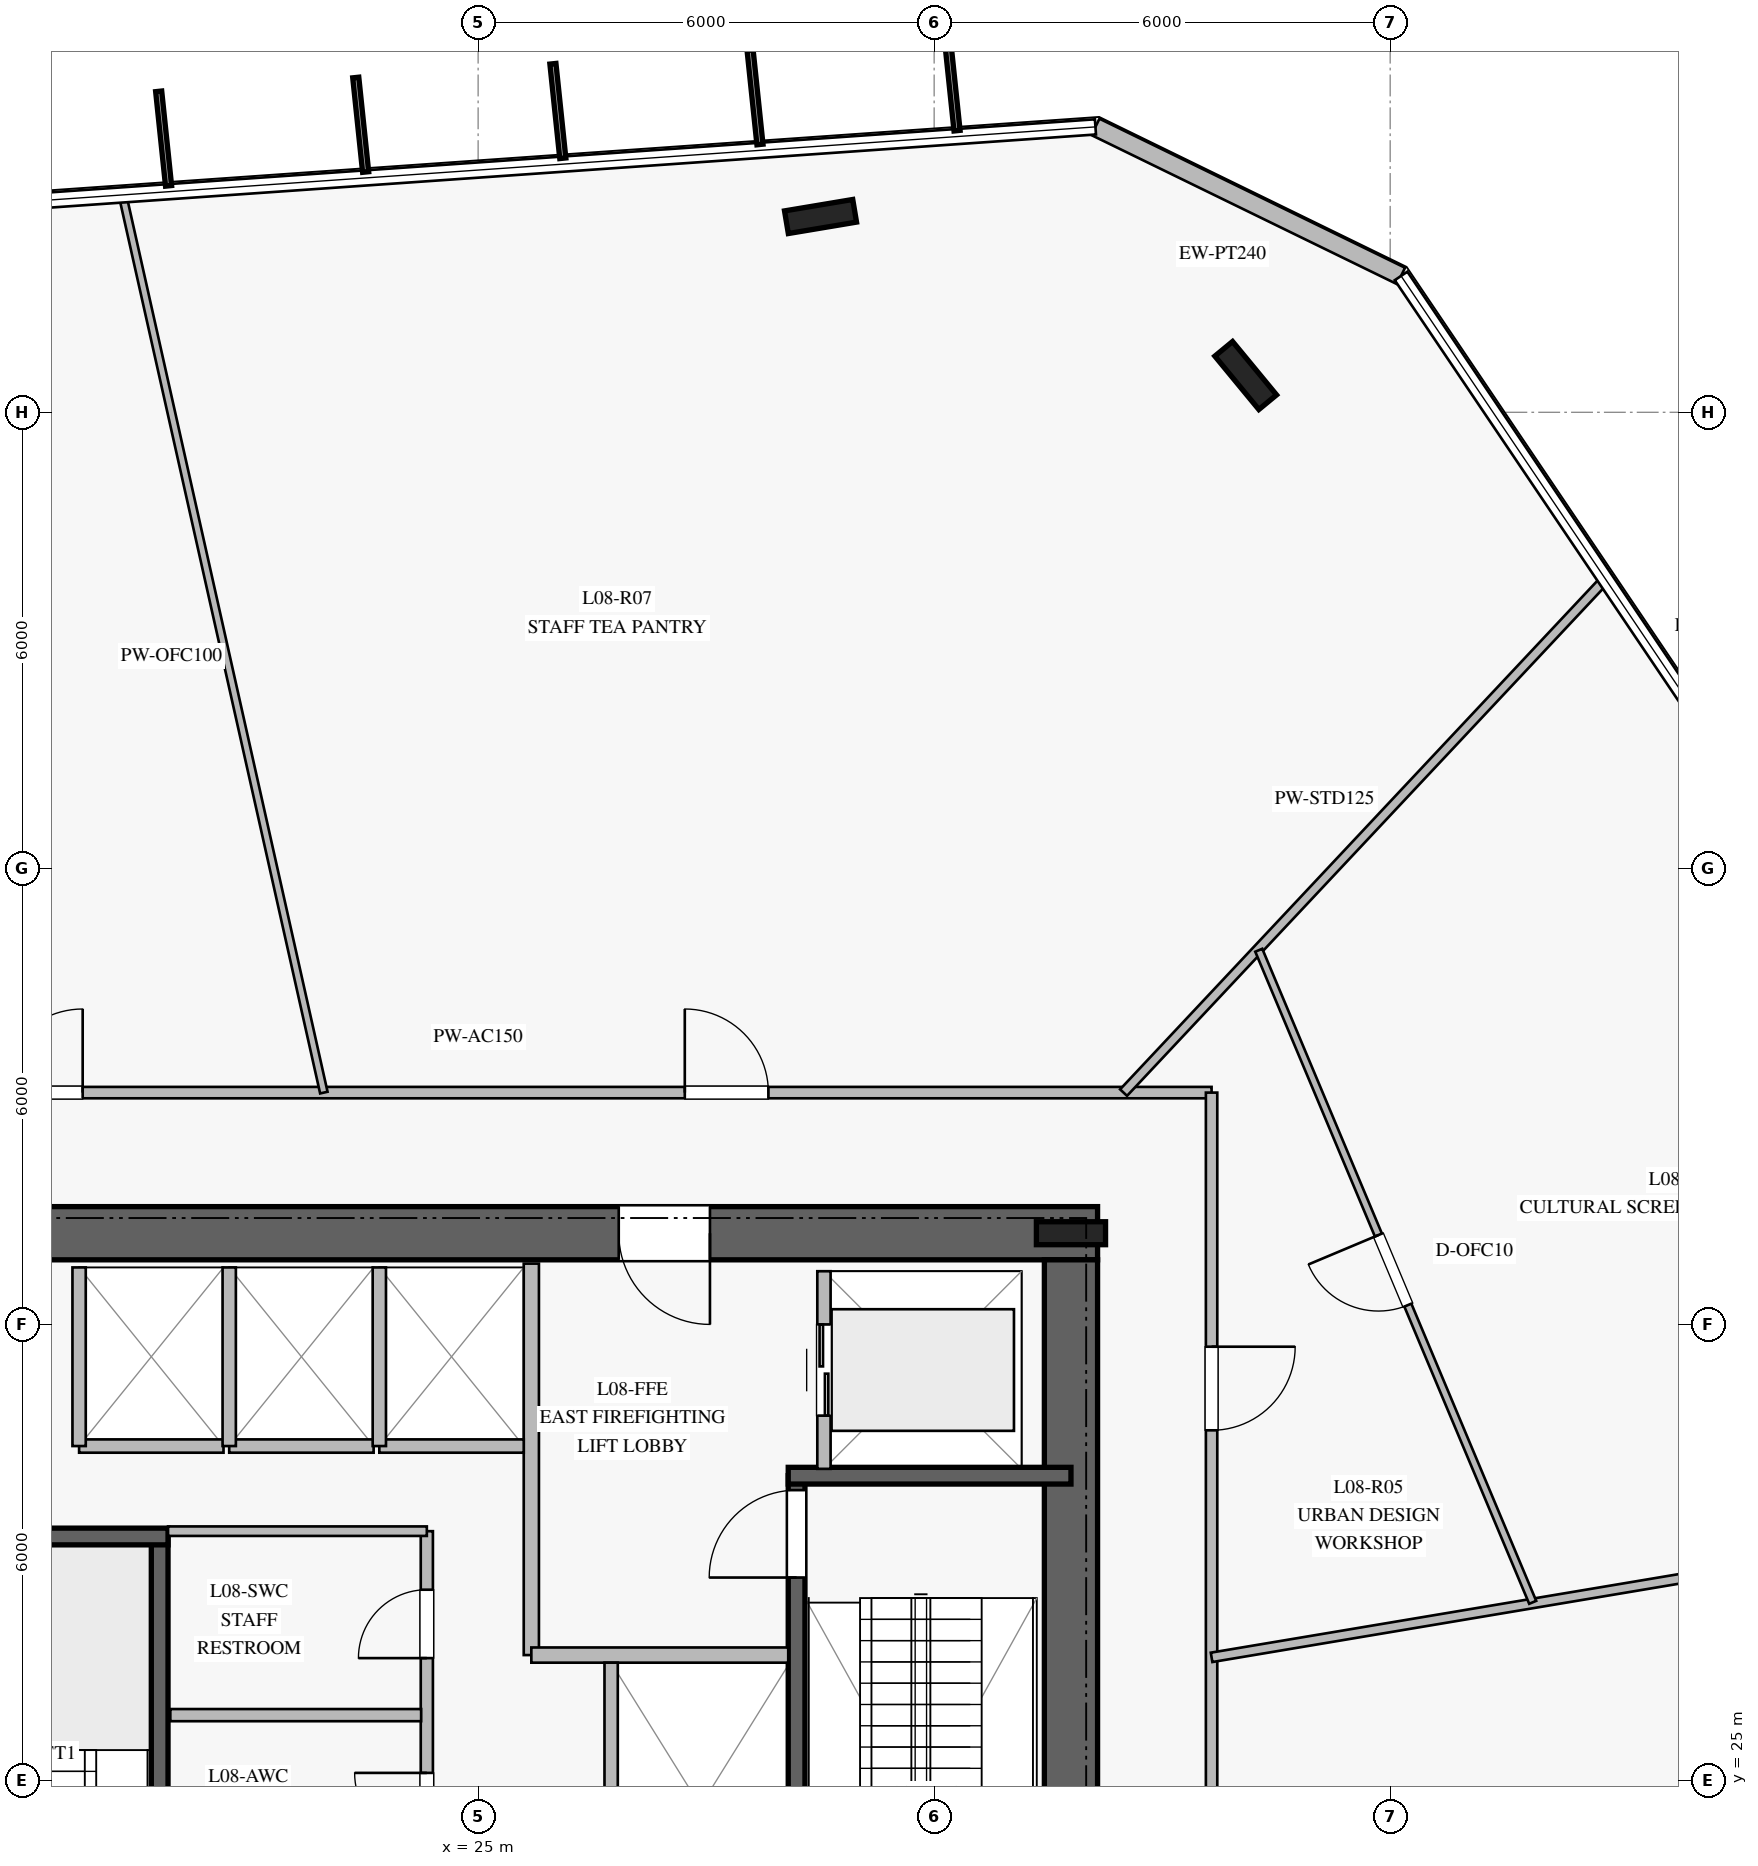
"""IFC4 building model, lengths in metres.
Left out: names, types, materials, properties, quantities, classifications, styles, units other than length and angle.
Written with IfcOpenShell. Run it as: python <this file> out.ifc"""

import sys

from ifc_helpers import new_model, si_unit, direction, frame, frame_2d, origin, origin_2d, place, context, subcontext, project, spatial, rectangle, i_section, extrude, element, fill, save


model = new_model("IFC4")
c1 = context("Model", 3, precision=1e-05, world=origin(), true_north=direction((0.0, 1.0)))
c2 = subcontext(c1, "Body", "Model", "MODEL_VIEW")
j1 = project(units=[si_unit("LENGTHUNIT", "METRE"), si_unit("PLANEANGLEUNIT", "RADIAN")], contexts=[c1])
p1 = place(None, origin())
s1 = spatial("IfcSite", under=j1, at=p1, CompositionType="ELEMENT")
p2 = place(p1, origin())
s2 = spatial("IfcBuilding", under=s1, at=p2, CompositionType="ELEMENT")
p3 = place(p2, frame((0.0, 0.0, 36.0)))
s3 = spatial("IfcBuildingStorey", under=s2, at=p3, CompositionType="ELEMENT", Elevation=36.0)
p4 = place(p3, frame((33.15, 32.2, 0.0), z_axis=(0.0, 0.0, 1.0), x_axis=(-1.0, 0.0, 0.0)))
e1 = element("IfcWall", 1, at=p4, inside=s3, PredefinedType="SHEAR", context=c2, shape_type="SweptSolid", body=[
    extrude(rectangle(XDim=16.3, YDim=0.7, at=frame_2d((8.15, 0.0))), origin(), (0.0, 0.0, 1.0), 3.76),
])
p5 = place(p4, frame((5.1, 0.0, 0.0)))
e2 = element("IfcOpeningElement", 2, at=p5, cuts=e1, PredefinedType="OPENING", context=c2, shape_type="SweptSolid", body=[
    extrude(rectangle(XDim=1.2, YDim=2.25, at=frame_2d((0.6, 1.125))), frame((0.0, 0.36, 0.0), z_axis=(0.0, -1.0, 0.0), x_axis=(1.0, 0.0, 0.0)), (0.0, 0.0, 1.0), 0.72),
])
p6 = place(p3, frame((32.8, 18.15, 0.0), z_axis=(0.0, 0.0, 1.0), x_axis=(0.0, 1.0, 0.0)))
e3 = element("IfcWall", 3, at=p6, inside=s3, PredefinedType="SHEAR", context=c2, shape_type="SweptSolid", body=[
    extrude(rectangle(XDim=13.7, YDim=0.7, at=frame_2d((6.85, 0.0))), origin(), (0.0, 0.0, 1.0), 3.76),
])
p7 = place(p3, frame((32.8, 32.2, 0.0), z_axis=(0.0, 0.0, 1.0), x_axis=(1.0, 0.0, 0.0)))
e4 = element("IfcColumn", 4, at=p7, inside=s3, PredefinedType="COLUMN", context=c2, shape_type="SweptSolid", body=[
    extrude(i_section(OverallWidth=0.302, OverallDepth=0.91, WebThickness=0.021, FlangeThickness=0.04, at=origin_2d()), origin(), (0.0, 0.0, 1.0), 4.0),
])
p8 = place(p3, frame((20.81, 20.99, 0.0), z_axis=(0.0, 0.0, 1.0), x_axis=(0.0, 1.0, 0.0)))
e5 = element("IfcWall", 5, at=p8, inside=s3, PredefinedType="SOLIDWALL", context=c2, shape_type="SweptSolid", body=[
    extrude(rectangle(XDim=7.22, YDim=0.22, at=frame_2d((3.61, 0.0))), origin(), (0.0, 0.0, 1.0), 3.76),
])
p9 = place(p8, frame((0.18, 0.0, 0.0)))
e6 = element("IfcOpeningElement", 6, at=p9, cuts=e5, PredefinedType="OPENING", context=c2, shape_type="SweptSolid", body=[
    extrude(rectangle(XDim=1.15, YDim=2.2, at=frame_2d((0.575, 1.1))), frame((0.0, 0.12, 0.0), z_axis=(0.0, -1.0, 0.0), x_axis=(1.0, 0.0, 0.0)), (0.0, 0.0, 1.0), 0.24),
])
p10 = place(p3, frame((17.2, 28.21, 0.0), z_axis=(0.0, 0.0, 1.0), x_axis=(1.0, 0.0, 0.0)))
e7 = element("IfcWall", 7, at=p10, inside=s3, PredefinedType="SOLIDWALL", context=c2, shape_type="SweptSolid", body=[
    extrude(rectangle(XDim=3.72, YDim=0.22, at=frame_2d((1.86, 0.0))), origin(), (0.0, 0.0, 1.0), 3.76),
])
p11 = place(p3, frame((29.19, 21.79, 0.0), z_axis=(0.0, 0.0, 1.0), x_axis=(0.0, 1.0, 0.0)))
e8 = element("IfcWall", 8, at=p11, inside=s3, PredefinedType="SOLIDWALL", context=c2, shape_type="SweptSolid", body=[
    extrude(rectangle(XDim=7.22, YDim=0.22, at=frame_2d((3.61, 0.0))), origin(), (0.0, 0.0, 1.0), 3.76),
])
p12 = place(p11, frame((5.88, 0.0, 0.0)))
e9 = element("IfcOpeningElement", 9, at=p12, cuts=e8, PredefinedType="OPENING", context=c2, shape_type="SweptSolid", body=[
    extrude(rectangle(XDim=1.15, YDim=2.2, at=frame_2d((0.575, 1.1))), frame((0.0, 0.12, 0.0), z_axis=(0.0, -1.0, 0.0), x_axis=(1.0, 0.0, 0.0)), (0.0, 0.0, 1.0), 0.24),
])
p13 = place(p3, frame((29.08, 29.01, 0.0), z_axis=(0.0, 0.0, 1.0), x_axis=(1.0, 0.0, 0.0)))
e10 = element("IfcWall", 10, at=p13, inside=s3, PredefinedType="SOLIDWALL", context=c2, shape_type="SweptSolid", body=[
    extrude(rectangle(XDim=3.72, YDim=0.22, at=frame_2d((1.86, 0.0))), origin(), (0.0, 0.0, 1.0), 3.76),
])
for number, where, z_axis, x_axis in (
    (11, (35.099, 43.484, 0.0), (0.0, 0.0, 1.0), (-0.636, 0.772, 0.0)),
    (12, (29.505, 45.576, 0.0), (0.0, 0.0, 1.0), (0.986, 0.165, 0.0)),
):
    element("IfcColumn", number, at=place(p3, frame(where, z_axis=z_axis, x_axis=x_axis)), inside=s3, PredefinedType="COLUMN", context=c2, shape_type="SweptSolid", body=[
        extrude(i_section(OverallWidth=0.302, OverallDepth=0.91, WebThickness=0.021, FlangeThickness=0.04, at=origin_2d()), origin(), (0.0, 0.0, 1.0), 4.0),
    ])
p14 = place(p3, frame((37.143, 44.794, 0.0), z_axis=(0.0, 0.0, 1.0), x_axis=(-0.898814595488, 0.438329012202, 0.0)))
e13 = element("IfcWall", 13, at=p14, inside=s3, PredefinedType="STANDARD", context=c2, shape_type="SweptSolid", body=[
    extrude(rectangle(XDim=4.474, YDim=0.24, at=frame_2d((2.237, 0.0))), origin(), (0.0, 0.0, 1.0), 3.76),
])
p15 = place(p3, frame((25.7, 26.65, 0.0), z_axis=(0.0, 0.0, 1.0), x_axis=(0.0, 1.0, 0.0)))
e14 = element("IfcWall", 14, at=p15, inside=s3, PredefinedType="PARTITIONING", context=c2, shape_type="SweptSolid", body=[
    extrude(rectangle(XDim=5.15, YDim=0.2, at=frame_2d((2.575, 0.0))), origin(), (0.0, 0.0, 1.0), 3.76),
])
p16 = place(p3, frame((25.7, 26.65, 0.0), z_axis=(0.0, 0.0, 1.0), x_axis=(1.0, 0.0, 0.0)))
e15 = element("IfcWall", 15, at=p16, inside=s3, PredefinedType="PARTITIONING", context=c2, shape_type="SweptSolid", body=[
    extrude(rectangle(XDim=3.38, YDim=0.2, at=frame_2d((1.69, 0.0))), origin(), (0.0, 0.0, 1.0), 3.76),
])
p17 = place(p3, frame((24.325, 23.35, 0.0), z_axis=(0.0, 0.0, 1.0), x_axis=(0.0, 1.0, 0.0)))
e16 = element("IfcWall", 16, at=p17, inside=s3, PredefinedType="PLUMBINGWALL", context=c2, shape_type="SweptSolid", body=[
    extrude(rectangle(XDim=4.93, YDim=0.16, at=frame_2d((2.465, 0.0))), origin(), (0.0, 0.0, 1.0), 3.76),
])
p18 = place(p17, frame((0.8, 0.0, 0.0)))
e17 = element("IfcOpeningElement", 17, at=p18, cuts=e16, PredefinedType="OPENING", context=c2, shape_type="SweptSolid", body=[
    extrude(rectangle(XDim=0.95, YDim=2.1, at=frame_2d((0.475, 1.05))), frame((0.0, 0.09, 0.0), z_axis=(0.0, -1.0, 0.0), x_axis=(1.0, 0.0, 0.0)), (0.0, 0.0, 1.0), 0.18),
])
p19 = place(p17, frame((3.26, 0.0, 0.0)))
e18 = element("IfcOpeningElement", 18, at=p19, cuts=e16, PredefinedType="OPENING", context=c2, shape_type="SweptSolid", body=[
    extrude(rectangle(XDim=0.9, YDim=2.1, at=frame_2d((0.45, 1.05))), frame((0.0, 0.09, 0.0), z_axis=(0.0, -1.0, 0.0), x_axis=(1.0, 0.0, 0.0)), (0.0, 0.0, 1.0), 0.18),
])
p20 = place(p3, frame((20.92, 28.28, 0.0), z_axis=(0.0, 0.0, 1.0), x_axis=(1.0, 0.0, 0.0)))
e19 = element("IfcWall", 19, at=p20, inside=s3, PredefinedType="PARTITIONING", context=c2, shape_type="SweptSolid", body=[
    extrude(rectangle(XDim=3.405, YDim=0.125, at=frame_2d((1.703, 0.0))), origin(), (0.0, 0.0, 1.0), 3.76),
])
p21 = place(p3, frame((20.95, 25.86, 0.0), z_axis=(0.0, 0.0, 1.0), x_axis=(1.0, 0.0, 0.0)))
e20 = element("IfcWall", 20, at=p21, inside=s3, PredefinedType="PLUMBINGWALL", context=c2, shape_type="SweptSolid", body=[
    extrude(rectangle(XDim=3.3, YDim=0.16, at=frame_2d((1.65, 0.0))), origin(), (0.0, 0.0, 1.0), 3.76),
])
p22 = place(p3, frame((19.75, 29.4, 0.0), z_axis=(0.0, 0.0, 1.0), x_axis=(1.0, 0.0, 0.0)))
e21 = element("IfcWall", 21, at=p22, inside=s3, PredefinedType="PARTITIONING", context=c2, shape_type="SweptSolid", body=[
    extrude(rectangle(XDim=1.9, YDim=0.175, at=frame_2d((0.95, 0.0))), origin(), (0.0, 0.0, 1.0), 3.76),
])
p23 = place(p3, frame((19.75, 29.4, 0.0), z_axis=(0.0, 0.0, 1.0), x_axis=(0.0, 1.0, 0.0)))
e22 = element("IfcWall", 22, at=p23, inside=s3, PredefinedType="PARTITIONING", context=c2, shape_type="SweptSolid", body=[
    extrude(rectangle(XDim=2.35, YDim=0.175, at=frame_2d((1.175, 0.0))), origin(), (0.0, 0.0, 1.0), 3.76),
])
p24 = place(p3, frame((21.725, 29.4, 0.0), z_axis=(0.0, 0.0, 1.0), x_axis=(1.0, 0.0, 0.0)))
e23 = element("IfcWall", 23, at=p24, inside=s3, PredefinedType="PARTITIONING", context=c2, shape_type="SweptSolid", body=[
    extrude(rectangle(XDim=1.9, YDim=0.175, at=frame_2d((0.95, 0.0))), origin(), (0.0, 0.0, 1.0), 3.76),
])
p25 = place(p3, frame((21.725, 29.4, 0.0), z_axis=(0.0, 0.0, 1.0), x_axis=(0.0, 1.0, 0.0)))
e24 = element("IfcWall", 24, at=p25, inside=s3, PredefinedType="PARTITIONING", context=c2, shape_type="SweptSolid", body=[
    extrude(rectangle(XDim=2.35, YDim=0.175, at=frame_2d((1.175, 0.0))), origin(), (0.0, 0.0, 1.0), 3.76),
])
p26 = place(p3, frame((23.7, 29.4, 0.0), z_axis=(0.0, 0.0, 1.0), x_axis=(1.0, 0.0, 0.0)))
e25 = element("IfcWall", 25, at=p26, inside=s3, PredefinedType="PARTITIONING", context=c2, shape_type="SweptSolid", body=[
    extrude(rectangle(XDim=1.9, YDim=0.175, at=frame_2d((0.95, 0.0))), origin(), (0.0, 0.0, 1.0), 3.76),
])
p27 = place(p3, frame((23.7, 29.4, 0.0), z_axis=(0.0, 0.0, 1.0), x_axis=(0.0, 1.0, 0.0)))
e26 = element("IfcWall", 26, at=p27, inside=s3, PredefinedType="PARTITIONING", context=c2, shape_type="SweptSolid", body=[
    extrude(rectangle(XDim=2.35, YDim=0.175, at=frame_2d((1.175, 0.0))), origin(), (0.0, 0.0, 1.0), 3.76),
])
p28 = place(p3, frame((26.75, 24.65, 0.0), z_axis=(0.0, 0.0, 1.0), x_axis=(0.0, 1.0, 0.0)))
e27 = element("IfcWall", 27, at=p28, inside=s3, PredefinedType="PARTITIONING", context=c2, shape_type="SweptSolid", body=[
    extrude(rectangle(XDim=1.9, YDim=0.175, at=frame_2d((0.95, 0.0))), origin(), (0.0, 0.0, 1.0), 3.76),
])
p29 = place(p3, frame((29.55, 29.1, 0.0), z_axis=(0.0, 0.0, 1.0), x_axis=(0.0, 1.0, 0.0)))
e28 = element("IfcWall", 28, at=p29, inside=s3, PredefinedType="PARTITIONING", context=c2, shape_type="SweptSolid", body=[
    extrude(rectangle(XDim=2.6, YDim=0.175, at=frame_2d((1.3, 0.0))), origin(), (0.0, 0.0, 1.0), 3.76),
])
p30 = place(p29, frame((0.7, 0.0, 0.0)))
e29 = element("IfcOpeningElement", 29, at=p30, cuts=e28, PredefinedType="OPENING", context=c2, shape_type="SweptSolid", body=[
    extrude(rectangle(XDim=1.2, YDim=2.2, at=frame_2d((0.6, 1.1))), frame((0.0, 0.098, 0.0), z_axis=(0.0, -1.0, 0.0), x_axis=(1.0, 0.0, 0.0)), (0.0, 0.0, 1.0), 0.195),
])
p31 = place(p3, frame((15.35, 34.05, 0.0), z_axis=(0.0, 0.0, 1.0), x_axis=(1.0, 0.0, 0.0)))
e30 = element("IfcWall", 30, at=p31, inside=s3, PredefinedType="PARTITIONING", context=c2, shape_type="SweptSolid", body=[
    extrude(rectangle(XDim=19.3, YDim=0.15, at=frame_2d((9.65, 0.0))), origin(), (0.0, 0.0, 1.0), 3.21),
])
p32 = place(p31, frame((12.369, 0.0, 0.0)))
e31 = element("IfcOpeningElement", 31, at=p32, cuts=e30, PredefinedType="OPENING", context=c2, shape_type="SweptSolid", body=[
    extrude(rectangle(XDim=1.1, YDim=2.2, at=frame_2d((0.55, 1.1))), frame((0.0, 0.085, 0.0), z_axis=(0.0, -1.0, 0.0), x_axis=(1.0, 0.0, 0.0)), (0.0, 0.0, 1.0), 0.17),
])
p33 = place(p31, frame((3.347, 0.0, 0.0)))
e32 = element("IfcOpeningElement", 32, at=p33, cuts=e30, PredefinedType="OPENING", context=c2, shape_type="SweptSolid", body=[
    extrude(rectangle(XDim=1.1, YDim=2.2, at=frame_2d((0.55, 1.1))), frame((0.0, 0.085, 0.0), z_axis=(0.0, -1.0, 0.0), x_axis=(1.0, 0.0, 0.0)), (0.0, 0.0, 1.0), 0.17),
])
p34 = place(p3, frame((34.65, 34.05, 0.0), z_axis=(0.0, 0.0, 1.0), x_axis=(0.0, -1.0, 0.0)))
e33 = element("IfcWall", 33, at=p34, inside=s3, PredefinedType="PARTITIONING", context=c2, shape_type="SweptSolid", body=[
    extrude(rectangle(XDim=18.1, YDim=0.15, at=frame_2d((9.05, 0.0))), origin(), (0.0, 0.0, 1.0), 3.21),
])
p35 = place(p34, frame((11.691, 0.0, 0.0)))
e34 = element("IfcOpeningElement", 34, at=p35, cuts=e33, PredefinedType="OPENING", context=c2, shape_type="SweptSolid", body=[
    extrude(rectangle(XDim=1.1, YDim=2.2, at=frame_2d((0.55, 1.1))), frame((0.0, 0.085, 0.0), z_axis=(0.0, -1.0, 0.0), x_axis=(1.0, 0.0, 0.0)), (0.0, 0.0, 1.0), 0.17),
])
p36 = place(p34, frame((3.343, 0.0, 0.0)))
e35 = element("IfcOpeningElement", 35, at=p36, cuts=e33, PredefinedType="OPENING", context=c2, shape_type="SweptSolid", body=[
    extrude(rectangle(XDim=1.1, YDim=2.2, at=frame_2d((0.55, 1.1))), frame((0.0, 0.085, 0.0), z_axis=(0.0, -1.0, 0.0), x_axis=(1.0, 0.0, 0.0)), (0.0, 0.0, 1.0), 0.17),
])
p37 = place(p3, frame((33.492, 34.05, 0.0), z_axis=(0.0, 0.0, 1.0), x_axis=(0.684323058839, 0.72917895687, 0.0)))
e36 = element("IfcWall", 36, at=p37, inside=s3, PredefinedType="PARTITIONING", context=c2, shape_type="SweptSolid", body=[
    extrude(rectangle(XDim=9.247, YDim=0.125, at=frame_2d((4.624, 0.0))), origin(), (0.0, 0.0, 1.0), 3.06),
])
p38 = place(p3, frame((22.97, 34.05, 0.0), z_axis=(0.0, 0.0, 1.0), x_axis=(-0.218867992102, 0.975754478357, 0.0)))
e37 = element("IfcWall", 37, at=p38, inside=s3, PredefinedType="MOVABLE", context=c2, shape_type="SweptSolid", body=[
    extrude(rectangle(XDim=12.085, YDim=0.1, at=frame_2d((6.042, 0.0))), origin(), (0.0, 0.0, 1.0), 3.05),
])
p39 = place(p3, frame((34.65, 26.62, 0.0), z_axis=(0.0, 0.0, 1.0), x_axis=(0.986204923265, 0.165528998449, 0.0)))
e38 = element("IfcWall", 38, at=p39, inside=s3, PredefinedType="PARTITIONING", context=c2, shape_type="SweptSolid", body=[
    extrude(rectangle(XDim=13.417, YDim=0.125, at=frame_2d((6.708, 0.0))), origin(), (0.0, 0.0, 1.0), 3.06),
])
p40 = place(p3, frame((38.875, 27.344, 0.0), z_axis=(0.0, 0.0, 1.0), x_axis=(-0.387303850875, 0.92195212842, 0.0)))
e39 = element("IfcWall", 39, at=p40, inside=s3, PredefinedType="MOVABLE", context=c2, shape_type="SweptSolid", body=[
    extrude(rectangle(XDim=9.305, YDim=0.1, at=frame_2d((4.653, 0.0))), origin(), (0.0, 0.0, 1.0), 3.21),
])
p41 = place(p40, frame((4.241, 0.0, 0.0)))
e40 = element("IfcOpeningElement", 40, at=p41, cuts=e39, PredefinedType="OPENING", context=c2, shape_type="SweptSolid", body=[
    extrude(rectangle(XDim=1.0, YDim=2.15, at=frame_2d((0.5, 1.075))), frame((0.0, 0.06, 0.0), z_axis=(0.0, -1.0, 0.0), x_axis=(1.0, 0.0, 0.0)), (0.0, 0.0, 1.0), 0.12),
])
p42 = place(p12, origin())
e41 = element("IfcDoor", 41, at=p42, inside=s3, OperationType="SINGLE_SWING_LEFT", PredefinedType="DOOR", context=c2, shape_type="SweptSolid", body=[
    extrude(rectangle(XDim=1.15, YDim=2.2, at=frame_2d((0.575, 1.1))), frame((0.0, 0.025, 0.0), z_axis=(0.0, -1.0, 0.0), x_axis=(1.0, 0.0, 0.0)), (0.0, 0.0, 1.0), 0.05),
])
fill(e9, e41)
p43 = place(p5, origin())
e42 = element("IfcDoor", 42, at=p43, inside=s3, OperationType="SINGLE_SWING_LEFT", PredefinedType="DOOR", context=c2, shape_type="SweptSolid", body=[
    extrude(rectangle(XDim=1.2, YDim=2.25, at=frame_2d((0.6, 1.125))), frame((0.0, 0.025, 0.0), z_axis=(0.0, -1.0, 0.0), x_axis=(1.0, 0.0, 0.0)), (0.0, 0.0, 1.0), 0.05),
])
fill(e2, e42)
p44 = place(p18, origin())
e43 = element("IfcDoor", 43, at=p44, inside=s3, OperationType="SINGLE_SWING_RIGHT", PredefinedType="DOOR", context=c2, shape_type="SweptSolid", body=[
    extrude(rectangle(XDim=0.95, YDim=2.1, at=frame_2d((0.475, 1.05))), frame((0.0, 0.025, 0.0), z_axis=(0.0, -1.0, 0.0), x_axis=(1.0, 0.0, 0.0)), (0.0, 0.0, 1.0), 0.05),
])
fill(e17, e43)
p45 = place(p19, origin())
e44 = element("IfcDoor", 44, at=p45, inside=s3, OperationType="SINGLE_SWING_LEFT", PredefinedType="DOOR", context=c2, shape_type="SweptSolid", body=[
    extrude(rectangle(XDim=0.9, YDim=2.1, at=frame_2d((0.45, 1.05))), frame((0.0, 0.025, 0.0), z_axis=(0.0, -1.0, 0.0), x_axis=(1.0, 0.0, 0.0)), (0.0, 0.0, 1.0), 0.05),
])
fill(e18, e44)
p46 = place(p30, origin())
e45 = element("IfcDoor", 45, at=p46, inside=s3, OperationType="DOUBLE_DOOR_SLIDING", PredefinedType="DOOR", context=c2, shape_type="SweptSolid", body=[
    extrude(rectangle(XDim=1.2, YDim=2.2, at=frame_2d((0.6, 1.1))), frame((0.0, 0.025, 0.0), z_axis=(0.0, -1.0, 0.0), x_axis=(1.0, 0.0, 0.0)), (0.0, 0.0, 1.0), 0.05),
])
fill(e29, e45)
p47 = place(p36, origin())
e46 = element("IfcDoor", 46, at=p47, inside=s3, OperationType="SINGLE_SWING_LEFT", PredefinedType="DOOR", context=c2, shape_type="SweptSolid", body=[
    extrude(rectangle(XDim=1.1, YDim=2.2, at=frame_2d((0.55, 1.1))), frame((0.0, 0.025, 0.0), z_axis=(0.0, -1.0, 0.0), x_axis=(1.0, 0.0, 0.0)), (0.0, 0.0, 1.0), 0.05),
])
fill(e35, e46)
p48 = place(p41, origin())
e47 = element("IfcDoor", 47, at=p48, inside=s3, OperationType="SINGLE_SWING_RIGHT", PredefinedType="DOOR", context=c2, shape_type="SweptSolid", body=[
    extrude(rectangle(XDim=1.0, YDim=2.15, at=frame_2d((0.5, 1.075))), frame((0.0, 0.025, 0.0), z_axis=(0.0, -1.0, 0.0), x_axis=(1.0, 0.0, 0.0)), (0.0, 0.0, 1.0), 0.05),
])
fill(e40, e47)
p49 = place(p32, origin())
e48 = element("IfcDoor", 48, at=p49, inside=s3, OperationType="SINGLE_SWING_LEFT", PredefinedType="DOOR", context=c2, shape_type="SweptSolid", body=[
    extrude(rectangle(XDim=1.1, YDim=2.2, at=frame_2d((0.55, 1.1))), frame((0.0, 0.025, 0.0), z_axis=(0.0, -1.0, 0.0), x_axis=(1.0, 0.0, 0.0)), (0.0, 0.0, 1.0), 0.05),
])
fill(e31, e48)
p50 = place(p33, origin())
e49 = element("IfcDoor", 49, at=p50, inside=s3, OperationType="SINGLE_SWING_RIGHT", PredefinedType="DOOR", context=c2, shape_type="SweptSolid", body=[
    extrude(rectangle(XDim=1.1, YDim=2.2, at=frame_2d((0.55, 1.1))), frame((0.0, 0.025, 0.0), z_axis=(0.0, -1.0, 0.0), x_axis=(1.0, 0.0, 0.0)), (0.0, 0.0, 1.0), 0.05),
])
fill(e32, e49)
save(model, sys.argv[1])
